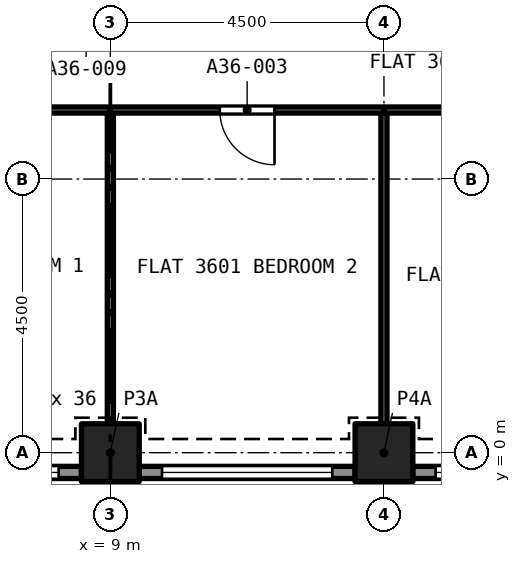
"""IFC4 building model, lengths in metres.
Left out: names, types, materials, properties, quantities, classifications, styles, units other than length and angle.
Written with IfcOpenShell. Run it as: python <this file> out.ifc"""

import sys

from ifc_helpers import new_model, si_unit, direction, frame, frame_2d, origin, origin_2d, place, context, subcontext, project, spatial, rectangle, extrude, element, fill, save


model = new_model("IFC4")
c1 = context("Model", 3, precision=1e-05, world=origin(), true_north=direction((0.0, 1.0)))
c2 = subcontext(c1, "Body", "Model", "MODEL_VIEW")
j1 = project(units=[si_unit("LENGTHUNIT", "METRE"), si_unit("PLANEANGLEUNIT", "RADIAN")], contexts=[c1])
p1 = place(None, origin())
s1 = spatial("IfcSite", under=j1, at=p1, CompositionType="ELEMENT")
p2 = place(p1, origin())
s2 = spatial("IfcBuilding", under=s1, at=p2, CompositionType="ELEMENT")
p3 = place(p2, frame((0.0, 0.0, 130.2)))
s3 = spatial("IfcBuildingStorey", under=s2, at=p3, CompositionType="ELEMENT", Elevation=130.2)
for number, where, z_axis, x_axis in (
    (1, (9.0, 0.0, 0.0), (0.0, 0.0, 1.0), (1.0, 0.0, 0.0)),
    (2, (13.5, 0.0, 0.0), (0.0, 0.0, 1.0), (1.0, 0.0, 0.0)),
):
    element("IfcColumn", number, at=place(p3, frame(where, z_axis=z_axis, x_axis=x_axis)), inside=s3, PredefinedType="COLUMN", context=c2, shape_type="SweptSolid", body=[
        extrude(rectangle(XDim=0.95, YDim=0.95, at=origin_2d()), origin(), (0.0, 0.0, 1.0), 3.2),
    ])
p4 = place(p3, frame((8.525, -0.325, 0.0), z_axis=(0.0, 0.0, 1.0), x_axis=(-1.0, 0.0, 0.0)))
e3 = element("IfcWall", 3, at=p4, inside=s3, PredefinedType="SOLIDWALL", context=c2, shape_type="SweptSolid", body=[
    extrude(rectangle(XDim=3.55, YDim=0.2, at=frame_2d((1.775, 0.0))), origin(), (0.0, 0.0, 1.0), 3.2),
])
p5 = place(p4, frame((0.375, 0.0, 0.45)))
e4 = element("IfcOpeningElement", 4, at=p5, cuts=e3, PredefinedType="OPENING", context=c2, shape_type="SweptSolid", body=[
    extrude(rectangle(XDim=2.8, YDim=1.95, at=frame_2d((1.4, 0.975))), frame((0.0, 0.11, 0.0), z_axis=(0.0, -1.0, 0.0), x_axis=(1.0, 0.0, 0.0)), (0.0, 0.0, 1.0), 0.22),
])
p6 = place(p3, frame((13.025, -0.325, 0.0), z_axis=(0.0, 0.0, 1.0), x_axis=(-1.0, 0.0, 0.0)))
e5 = element("IfcWall", 5, at=p6, inside=s3, PredefinedType="SOLIDWALL", context=c2, shape_type="SweptSolid", body=[
    extrude(rectangle(XDim=3.55, YDim=0.2, at=frame_2d((1.775, 0.0))), origin(), (0.0, 0.0, 1.0), 3.2),
])
p7 = place(p6, frame((0.375, 0.0, 0.45)))
e6 = element("IfcOpeningElement", 6, at=p7, cuts=e5, PredefinedType="OPENING", context=c2, shape_type="SweptSolid", body=[
    extrude(rectangle(XDim=2.8, YDim=1.95, at=frame_2d((1.4, 0.975))), frame((0.0, 0.11, 0.0), z_axis=(0.0, -1.0, 0.0), x_axis=(1.0, 0.0, 0.0)), (0.0, 0.0, 1.0), 0.22),
])
p8 = place(p3, frame((17.525, -0.325, 0.0), z_axis=(0.0, 0.0, 1.0), x_axis=(-1.0, 0.0, 0.0)))
e7 = element("IfcWall", 7, at=p8, inside=s3, PredefinedType="SOLIDWALL", context=c2, shape_type="SweptSolid", body=[
    extrude(rectangle(XDim=3.55, YDim=0.2, at=frame_2d((1.775, 0.0))), origin(), (0.0, 0.0, 1.0), 3.2),
])
p9 = place(p8, frame((0.375, 0.0, 0.45)))
e8 = element("IfcOpeningElement", 8, at=p9, cuts=e7, PredefinedType="OPENING", context=c2, shape_type="SweptSolid", body=[
    extrude(rectangle(XDim=2.8, YDim=1.95, at=frame_2d((1.4, 0.975))), frame((0.0, 0.11, 0.0), z_axis=(0.0, -1.0, 0.0), x_axis=(1.0, 0.0, 0.0)), (0.0, 0.0, 1.0), 0.22),
])
p10 = place(p3, frame((9.0, 0.475, 0.0), z_axis=(0.0, 0.0, 1.0), x_axis=(0.0, 1.0, 0.0)))
e9 = element("IfcWall", 9, at=p10, inside=s3, PredefinedType="PARTITIONING", context=c2, shape_type="SweptSolid", body=[
    extrude(rectangle(XDim=5.11, YDim=0.1, at=frame_2d((2.555, 0.0))), origin(), (0.0, 0.0, 1.0), 2.9),
])
p11 = place(p3, frame((9.0, 5.635, 0.0), z_axis=(0.0, 0.0, 1.0), x_axis=(-1.0, 0.0, 0.0)))
e10 = element("IfcWall", 10, at=p11, inside=s3, PredefinedType="PARTITIONING", context=c2, shape_type="SweptSolid", body=[
    extrude(rectangle(XDim=4.45, YDim=0.1, at=frame_2d((2.225, 0.0))), origin(), (0.0, 0.0, 1.0), 2.9),
])
p12 = place(p11, frame((1.8, 0.0, 0.0)))
e11 = element("IfcOpeningElement", 11, at=p12, cuts=e10, PredefinedType="OPENING", context=c2, shape_type="SweptSolid", body=[
    extrude(rectangle(XDim=0.9, YDim=2.1, at=frame_2d((0.45, 1.05))), frame((0.0, 0.06, 0.0), z_axis=(0.0, -1.0, 0.0), x_axis=(1.0, 0.0, 0.0)), (0.0, 0.0, 1.0), 0.12),
])
p13 = place(p3, frame((13.5, 0.475, 0.0), z_axis=(0.0, 0.0, 1.0), x_axis=(0.0, 1.0, 0.0)))
e12 = element("IfcWall", 12, at=p13, inside=s3, PredefinedType="PARTITIONING", context=c2, shape_type="SweptSolid", body=[
    extrude(rectangle(XDim=5.11, YDim=0.1, at=frame_2d((2.555, 0.0))), origin(), (0.0, 0.0, 1.0), 2.9),
])
p14 = place(p3, frame((13.5, 5.635, 0.0), z_axis=(0.0, 0.0, 1.0), x_axis=(-1.0, 0.0, 0.0)))
e13 = element("IfcWall", 13, at=p14, inside=s3, PredefinedType="PARTITIONING", context=c2, shape_type="SweptSolid", body=[
    extrude(rectangle(XDim=4.5, YDim=0.1, at=frame_2d((2.25, 0.0))), origin(), (0.0, 0.0, 1.0), 2.9),
])
p15 = place(p14, frame((1.8, 0.0, 0.0)))
e14 = element("IfcOpeningElement", 14, at=p15, cuts=e13, PredefinedType="OPENING", context=c2, shape_type="SweptSolid", body=[
    extrude(rectangle(XDim=0.9, YDim=2.1, at=frame_2d((0.45, 1.05))), frame((0.0, 0.06, 0.0), z_axis=(0.0, -1.0, 0.0), x_axis=(1.0, 0.0, 0.0)), (0.0, 0.0, 1.0), 0.12),
])
p16 = place(p3, frame((17.875, 5.635, 0.0), z_axis=(0.0, 0.0, 1.0), x_axis=(-1.0, 0.0, 0.0)))
e15 = element("IfcWall", 15, at=p16, inside=s3, PredefinedType="PARTITIONING", context=c2, shape_type="SweptSolid", body=[
    extrude(rectangle(XDim=4.375, YDim=0.1, at=frame_2d((2.188, 0.0))), origin(), (0.0, 0.0, 1.0), 2.9),
])
p17 = place(p16, frame((1.675, 0.0, 0.0)))
e16 = element("IfcOpeningElement", 16, at=p17, cuts=e15, PredefinedType="OPENING", context=c2, shape_type="SweptSolid", body=[
    extrude(rectangle(XDim=0.9, YDim=2.1, at=frame_2d((0.45, 1.05))), frame((0.0, 0.06, 0.0), z_axis=(0.0, -1.0, 0.0), x_axis=(1.0, 0.0, 0.0)), (0.0, 0.0, 1.0), 0.12),
])
p18 = place(p5, origin())
e17 = element("IfcWindow", 17, at=p18, inside=s3, PartitioningType="SINGLE_PANEL", PredefinedType="WINDOW", context=c2, shape_type="SweptSolid", body=[
    extrude(rectangle(XDim=2.8, YDim=1.95, at=frame_2d((1.4, 0.975))), frame((0.0, 0.03, 0.0), z_axis=(0.0, -1.0, 0.0), x_axis=(1.0, 0.0, 0.0)), (0.0, 0.0, 1.0), 0.06),
])
fill(e4, e17)
p19 = place(p7, origin())
e18 = element("IfcWindow", 18, at=p19, inside=s3, PartitioningType="SINGLE_PANEL", PredefinedType="WINDOW", context=c2, shape_type="SweptSolid", body=[
    extrude(rectangle(XDim=2.8, YDim=1.95, at=frame_2d((1.4, 0.975))), frame((0.0, 0.03, 0.0), z_axis=(0.0, -1.0, 0.0), x_axis=(1.0, 0.0, 0.0)), (0.0, 0.0, 1.0), 0.06),
])
fill(e6, e18)
p20 = place(p9, origin())
e19 = element("IfcWindow", 19, at=p20, inside=s3, PartitioningType="SINGLE_PANEL", PredefinedType="WINDOW", context=c2, shape_type="SweptSolid", body=[
    extrude(rectangle(XDim=2.8, YDim=1.95, at=frame_2d((1.4, 0.975))), frame((0.0, 0.03, 0.0), z_axis=(0.0, -1.0, 0.0), x_axis=(1.0, 0.0, 0.0)), (0.0, 0.0, 1.0), 0.06),
])
fill(e8, e19)
p21 = place(p15, origin())
e20 = element("IfcDoor", 20, at=p21, inside=s3, OperationType="SINGLE_SWING_LEFT", PredefinedType="DOOR", context=c2, shape_type="SweptSolid", body=[
    extrude(rectangle(XDim=0.9, YDim=2.1, at=frame_2d((0.45, 1.05))), frame((0.0, 0.025, 0.0), z_axis=(0.0, -1.0, 0.0), x_axis=(1.0, 0.0, 0.0)), (0.0, 0.0, 1.0), 0.05),
])
fill(e14, e20)
save(model, sys.argv[1])
